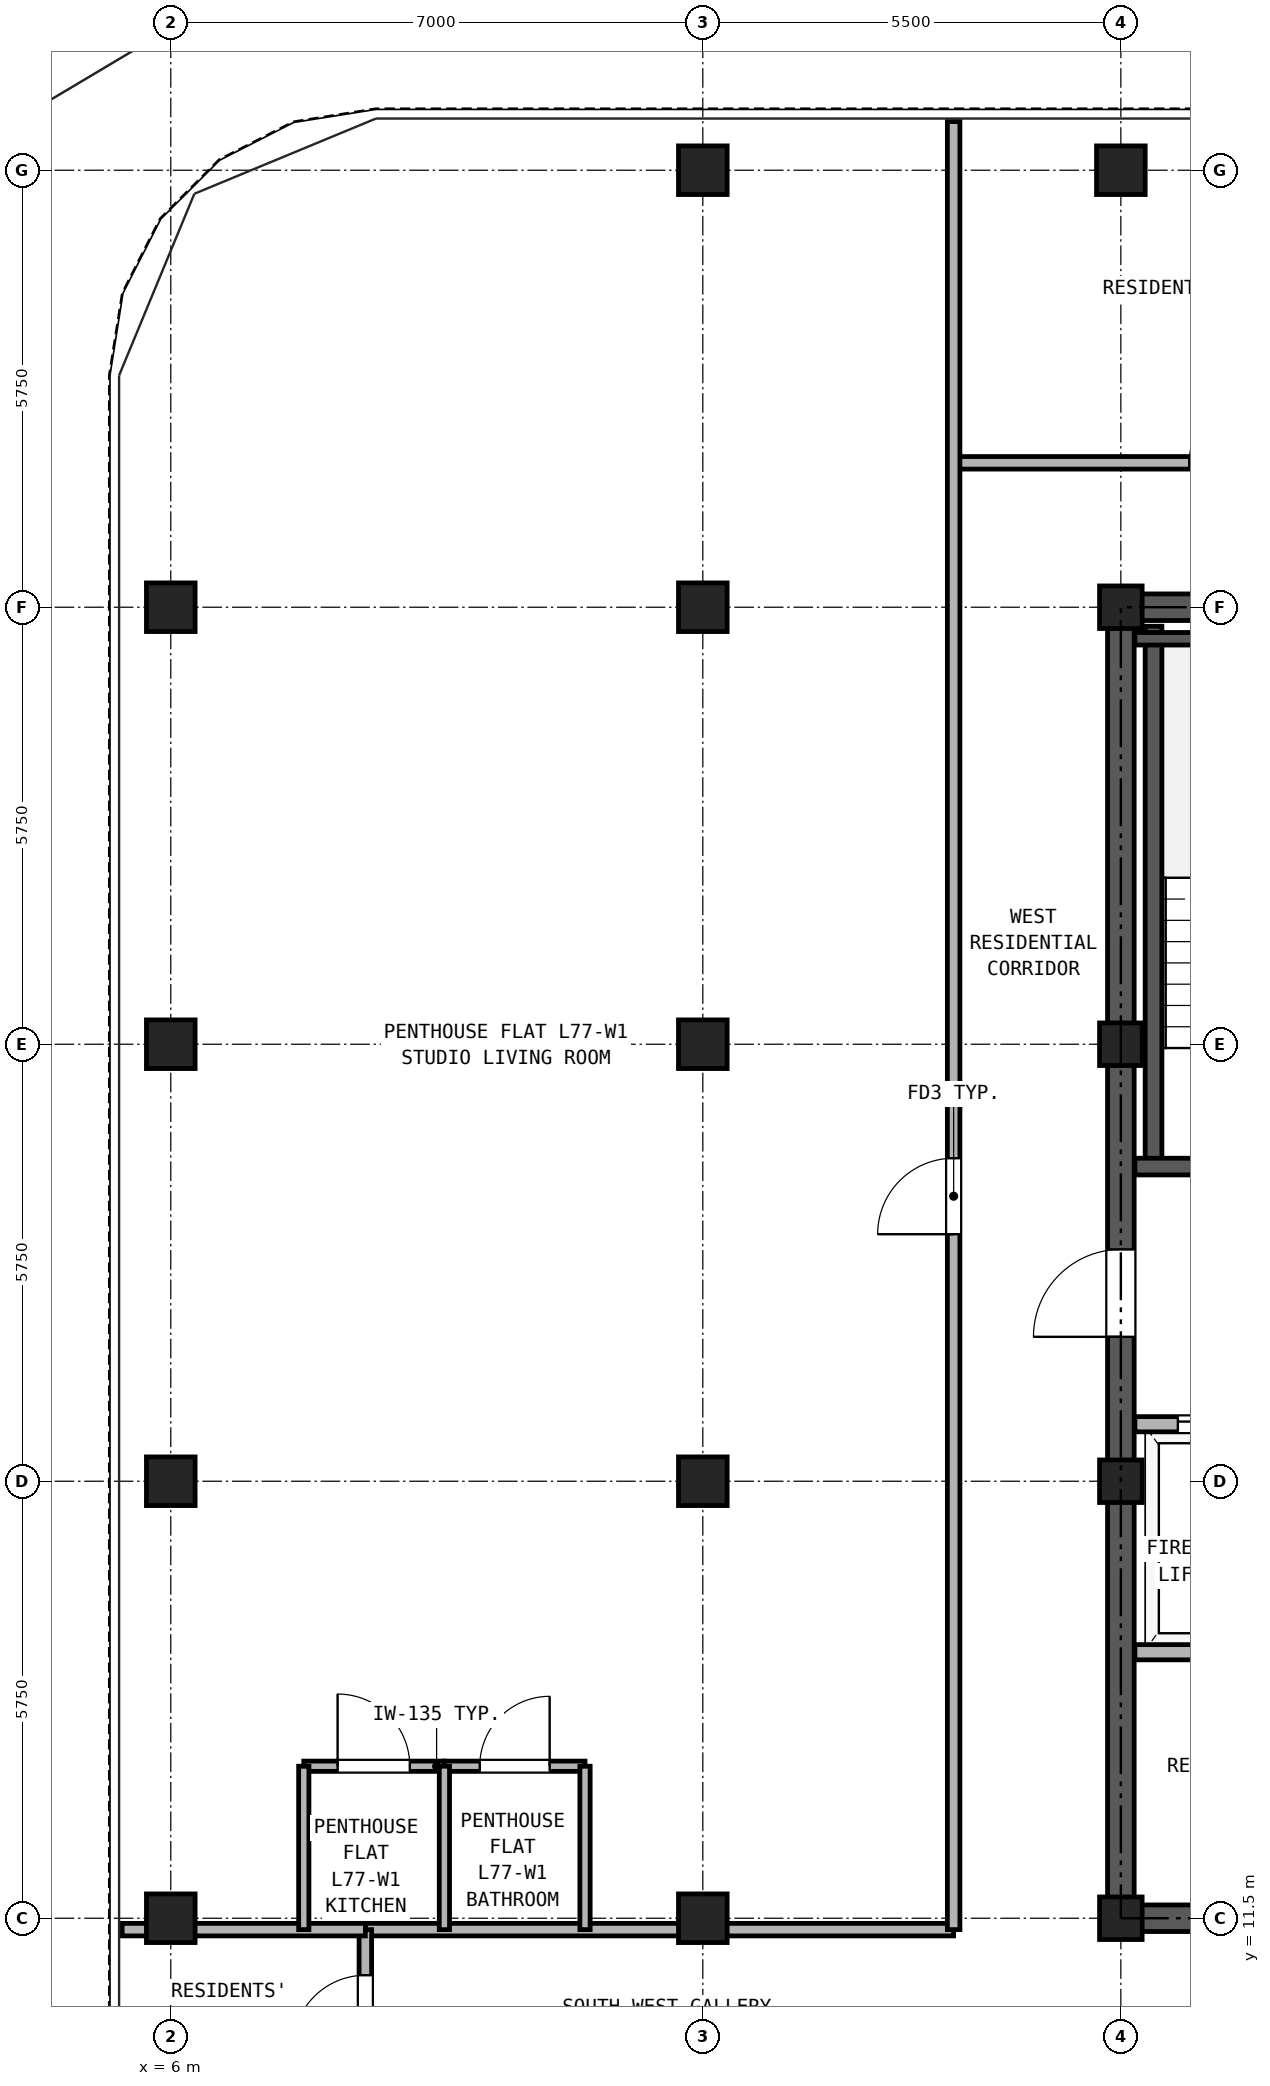
"""IFC4 building model, lengths in metres.
Left out: names, types, materials, properties, quantities, classifications, styles, units other than length and angle.
Written with IfcOpenShell. Run it as: python <this file> out.ifc"""

import sys

from ifc_helpers import new_model, si_unit, direction, frame, frame_2d, origin, origin_2d, place, context, subcontext, project, spatial, rectangle, hollow_rectangle, extrude, source, transform, mapped, element, fill, save


model = new_model("IFC4")
c1 = context("Model", 3, precision=1e-05, world=origin(), true_north=direction((0.0, 1.0)))
c2 = subcontext(c1, "Body", "Model", "MODEL_VIEW")
j1 = project(units=[si_unit("LENGTHUNIT", "METRE"), si_unit("PLANEANGLEUNIT", "RADIAN")], contexts=[c1])
p1 = place(None, origin())
s1 = spatial("IfcSite", under=j1, at=p1, CompositionType="ELEMENT")
p2 = place(p1, origin())
s2 = spatial("IfcBuilding", under=s1, at=p2, CompositionType="ELEMENT")
p3 = place(p2, frame((0.0, 0.0, 268.1)))
s3 = spatial("IfcBuildingStorey", under=s2, at=p3, CompositionType="ELEMENT", Elevation=268.1)
m1 = source(origin(), c2, "Body", "SweptSolid", [
    extrude(hollow_rectangle(XDim=0.64, YDim=0.64, WallThickness=0.035, at=origin_2d()), origin(), (0.0, 0.0, 1.0), 2.98),
])
for number, where, z_axis, x_axis in (
    (1, (13.0, 34.5, 0.0), (0.0, 0.0, 1.0), (1.0, 0.0, 0.0)),
    (2, (18.5, 34.5, 0.0), (0.0, 0.0, 1.0), (1.0, 0.0, 0.0)),
    (3, (6.0, 11.5, 0.0), (0.0, 0.0, 1.0), (1.0, 0.0, 0.0)),
    (4, (6.0, 17.25, 0.0), (0.0, 0.0, 1.0), (1.0, 0.0, 0.0)),
    (5, (6.0, 23.0, 0.0), (0.0, 0.0, 1.0), (1.0, 0.0, 0.0)),
    (6, (6.0, 28.75, 0.0), (0.0, 0.0, 1.0), (1.0, 0.0, 0.0)),
    (7, (13.0, 11.5, 0.0), (0.0, 0.0, 1.0), (1.0, 0.0, 0.0)),
    (8, (13.0, 17.25, 0.0), (0.0, 0.0, 1.0), (1.0, 0.0, 0.0)),
    (9, (13.0, 23.0, 0.0), (0.0, 0.0, 1.0), (1.0, 0.0, 0.0)),
    (10, (13.0, 28.75, 0.0), (0.0, 0.0, 1.0), (1.0, 0.0, 0.0)),
):
    element("IfcColumn", number, at=place(p3, frame(where, z_axis=z_axis, x_axis=x_axis)), inside=s3, PredefinedType="COLUMN", context=c2, shape_type="MappedRepresentation", body=[
        mapped(m1, transform((0.0, 0.0, 0.0), x_axis=(1.0, 0.0, 0.0), y_axis=(0.0, 1.0, 0.0), z_axis=(0.0, 0.0, 1.0), scale=1.0)),
    ])
m2 = source(origin(), c2, "Body", "SweptSolid", [
    extrude(hollow_rectangle(XDim=0.56, YDim=0.56, WallThickness=0.03, at=origin_2d()), origin(), (0.0, 0.0, 1.0), 2.98),
])
for number, where, z_axis, x_axis in (
    (11, (18.5, 11.5, 0.0), (0.0, 0.0, 1.0), (1.0, 0.0, 0.0)),
    (12, (18.5, 17.25, 0.0), (0.0, 0.0, 1.0), (1.0, 0.0, 0.0)),
    (13, (18.5, 23.0, 0.0), (0.0, 0.0, 1.0), (1.0, 0.0, 0.0)),
    (14, (18.5, 28.75, 0.0), (0.0, 0.0, 1.0), (1.0, 0.0, 0.0)),
):
    element("IfcColumn", number, at=place(p3, frame(where, z_axis=z_axis, x_axis=x_axis)), inside=s3, PredefinedType="COLUMN", context=c2, shape_type="MappedRepresentation", body=[
        mapped(m2, transform((0.0, 0.0, 0.0), x_axis=(1.0, 0.0, 0.0), y_axis=(0.0, 1.0, 0.0), z_axis=(0.0, 0.0, 1.0), scale=1.0)),
    ])
p4 = place(p3, frame((18.325, 11.5, 0.0), z_axis=(0.0, 0.0, 1.0), x_axis=(1.0, 0.0, 0.0)))
e15 = element("IfcWall", 15, at=p4, inside=s3, PredefinedType="SHEAR", context=c2, shape_type="SweptSolid", body=[
    extrude(rectangle(XDim=10.35, YDim=0.35, at=frame_2d((5.175, 0.0))), origin(), (0.0, 0.0, 1.0), 2.98),
])
p5 = place(p4, frame((1.775, 0.0, 0.0)))
e16 = element("IfcOpeningElement", 16, at=p5, cuts=e15, PredefinedType="OPENING", context=c2, shape_type="SweptSolid", body=[
    extrude(rectangle(XDim=0.95, YDim=2.15, at=frame_2d((0.475, 1.075))), frame((0.0, 0.185, 0.0), z_axis=(0.0, -1.0, 0.0), x_axis=(1.0, 0.0, 0.0)), (0.0, 0.0, 1.0), 0.37),
])
p6 = place(p4, frame((5.275, 0.0, 0.0)))
e17 = element("IfcOpeningElement", 17, at=p6, cuts=e15, PredefinedType="OPENING", context=c2, shape_type="SweptSolid", body=[
    extrude(rectangle(XDim=0.95, YDim=2.15, at=frame_2d((0.475, 1.075))), frame((0.0, 0.185, 0.0), z_axis=(0.0, -1.0, 0.0), x_axis=(1.0, 0.0, 0.0)), (0.0, 0.0, 1.0), 0.37),
])
p7 = place(p4, frame((8.175, 0.0, 0.0)))
e18 = element("IfcOpeningElement", 18, at=p7, cuts=e15, PredefinedType="OPENING", context=c2, shape_type="SweptSolid", body=[
    extrude(rectangle(XDim=1.1, YDim=2.25, at=frame_2d((0.55, 1.125))), frame((0.0, 0.185, 0.0), z_axis=(0.0, -1.0, 0.0), x_axis=(1.0, 0.0, 0.0)), (0.0, 0.0, 1.0), 0.37),
])
p8 = place(p3, frame((18.325, 28.75, 0.0), z_axis=(0.0, 0.0, 1.0), x_axis=(1.0, 0.0, 0.0)))
e19 = element("IfcWall", 19, at=p8, inside=s3, PredefinedType="SHEAR", context=c2, shape_type="SweptSolid", body=[
    extrude(rectangle(XDim=10.35, YDim=0.35, at=frame_2d((5.175, 0.0))), origin(), (0.0, 0.0, 1.0), 2.98),
])
p9 = place(p8, frame((4.055, 0.0, 0.0)))
e20 = element("IfcOpeningElement", 20, at=p9, cuts=e19, PredefinedType="OPENING", context=c2, shape_type="SweptSolid", body=[
    extrude(rectangle(XDim=0.9, YDim=2.05, at=frame_2d((0.45, 1.025))), frame((0.0, 0.185, 0.0), z_axis=(0.0, -1.0, 0.0), x_axis=(1.0, 0.0, 0.0)), (0.0, 0.0, 1.0), 0.37),
])
p10 = place(p8, frame((5.595, 0.0, 0.0)))
e21 = element("IfcOpeningElement", 21, at=p10, cuts=e19, PredefinedType="OPENING", context=c2, shape_type="SweptSolid", body=[
    extrude(rectangle(XDim=0.9, YDim=2.05, at=frame_2d((0.45, 1.025))), frame((0.0, 0.185, 0.0), z_axis=(0.0, -1.0, 0.0), x_axis=(1.0, 0.0, 0.0)), (0.0, 0.0, 1.0), 0.37),
])
p11 = place(p3, frame((18.5, 11.675, 0.0), z_axis=(0.0, 0.0, 1.0), x_axis=(0.0, 1.0, 0.0)))
e22 = element("IfcWall", 22, at=p11, inside=s3, PredefinedType="SHEAR", context=c2, shape_type="SweptSolid", body=[
    extrude(rectangle(XDim=16.9, YDim=0.35, at=frame_2d((8.45, 0.0))), origin(), (0.0, 0.0, 1.0), 2.98),
])
p12 = place(p11, frame((7.475, 0.0, 0.0)))
e23 = element("IfcOpeningElement", 23, at=p12, cuts=e22, PredefinedType="OPENING", context=c2, shape_type="SweptSolid", body=[
    extrude(rectangle(XDim=1.15, YDim=2.2, at=frame_2d((0.575, 1.1))), frame((0.0, 0.185, 0.0), z_axis=(0.0, -1.0, 0.0), x_axis=(1.0, 0.0, 0.0)), (0.0, 0.0, 1.0), 0.37),
])
p13 = place(p3, frame((18.93, 21.39, 0.0), z_axis=(0.0, 0.0, 1.0), x_axis=(0.0, 1.0, 0.0)))
e24 = element("IfcWall", 24, at=p13, inside=s3, PredefinedType="SOLIDWALL", context=c2, shape_type="SweptSolid", body=[
    extrude(rectangle(XDim=7.11, YDim=0.22, at=frame_2d((3.555, 0.0))), origin(), (0.0, 0.0, 1.0), 2.98),
])
p14 = place(p3, frame((18.685, 28.335, 0.0), z_axis=(0.0, 0.0, 1.0), x_axis=(1.0, 0.0, 0.0)))
e25 = element("IfcWall", 25, at=p14, inside=s3, PredefinedType="PARTITIONING", context=c2, shape_type="SweptSolid", body=[
    extrude(rectangle(XDim=3.425, YDim=0.165, at=frame_2d((1.712, 0.0))), origin(), (0.0, 0.0, 1.0), 2.98),
])
p15 = place(p3, frame((18.685, 21.39, 0.0), z_axis=(0.0, 0.0, 1.0), x_axis=(1.0, 0.0, 0.0)))
e26 = element("IfcWall", 26, at=p15, inside=s3, PredefinedType="SOLIDWALL", context=c2, shape_type="SweptSolid", body=[
    extrude(rectangle(XDim=6.445, YDim=0.22, at=frame_2d((3.222, 0.0))), origin(), (0.0, 0.0, 1.0), 2.98),
])
p16 = place(p15, frame((1.165, 0.0, 0.0)))
e27 = element("IfcOpeningElement", 27, at=p16, cuts=e26, PredefinedType="OPENING", context=c2, shape_type="SweptSolid", body=[
    extrude(rectangle(XDim=1.15, YDim=2.2, at=frame_2d((0.575, 1.1))), frame((0.0, 0.12, 0.0), z_axis=(0.0, -1.0, 0.0), x_axis=(1.0, 0.0, 0.0)), (0.0, 0.0, 1.0), 0.24),
])
p17 = place(p15, frame((4.895, 0.0, 0.0)))
e28 = element("IfcOpeningElement", 28, at=p17, cuts=e26, PredefinedType="OPENING", context=c2, shape_type="SweptSolid", body=[
    extrude(rectangle(XDim=1.1, YDim=2.25, at=frame_2d((0.55, 1.125))), frame((0.0, 0.12, 0.0), z_axis=(0.0, -1.0, 0.0), x_axis=(1.0, 0.0, 0.0)), (0.0, 0.0, 1.0), 0.24),
])
p18 = place(p3, frame((18.685, 18.0, 0.0), z_axis=(0.0, 0.0, 1.0), x_axis=(1.0, 0.0, 0.0)))
e29 = element("IfcWall", 29, at=p18, inside=s3, PredefinedType="PARTITIONING", context=c2, shape_type="SweptSolid", body=[
    extrude(rectangle(XDim=9.63, YDim=0.2, at=frame_2d((4.815, 0.0))), origin(), (0.0, 0.0, 1.0), 2.98),
])
p19 = place(p18, frame((0.565, 0.0, 0.0)))
e30 = element("IfcOpeningElement", 30, at=p19, cuts=e29, PredefinedType="OPENING", context=c2, shape_type="SweptSolid", body=[
    extrude(rectangle(XDim=1.3, YDim=2.3, at=frame_2d((0.65, 1.15))), frame((0.0, 0.11, 0.0), z_axis=(0.0, -1.0, 0.0), x_axis=(1.0, 0.0, 0.0)), (0.0, 0.0, 1.0), 0.22),
])
p20 = place(p18, frame((2.665, 0.0, 0.0)))
e31 = element("IfcOpeningElement", 31, at=p20, cuts=e29, PredefinedType="OPENING", context=c2, shape_type="SweptSolid", body=[
    extrude(rectangle(XDim=1.3, YDim=2.3, at=frame_2d((0.65, 1.15))), frame((0.0, 0.11, 0.0), z_axis=(0.0, -1.0, 0.0), x_axis=(1.0, 0.0, 0.0)), (0.0, 0.0, 1.0), 0.22),
])
p21 = place(p18, frame((7.165, 0.0, 0.0)))
e32 = element("IfcOpeningElement", 32, at=p21, cuts=e29, PredefinedType="OPENING", context=c2, shape_type="SweptSolid", body=[
    extrude(rectangle(XDim=1.0, YDim=2.15, at=frame_2d((0.5, 1.075))), frame((0.0, 0.11, 0.0), z_axis=(0.0, -1.0, 0.0), x_axis=(1.0, 0.0, 0.0)), (0.0, 0.0, 1.0), 0.22),
])
p22 = place(p3, frame((18.685, 15.0, 0.0), z_axis=(0.0, 0.0, 1.0), x_axis=(1.0, 0.0, 0.0)))
e33 = element("IfcWall", 33, at=p22, inside=s3, PredefinedType="PARTITIONING", context=c2, shape_type="SweptSolid", body=[
    extrude(rectangle(XDim=9.63, YDim=0.2, at=frame_2d((4.815, 0.0))), origin(), (0.0, 0.0, 1.0), 2.98),
])
p23 = place(p3, frame((8.56, 11.35, 0.0), z_axis=(0.0, 0.0, 1.0), x_axis=(1.0, 0.0, 0.0)))
e34 = element("IfcWall", 34, at=p23, inside=s3, PredefinedType="PARTITIONING", context=c2, shape_type="SweptSolid", body=[
    extrude(rectangle(XDim=7.74, YDim=0.165, at=frame_2d((3.87, 0.0))), origin(), (0.0, 0.0, 1.0), 2.428),
])
p24 = place(p3, frame((8.56, 9.35, 0.0), z_axis=(0.0, 0.0, 1.0), x_axis=(0.0, 1.0, 0.0)))
e35 = element("IfcWall", 35, at=p24, inside=s3, PredefinedType="PARTITIONING", context=c2, shape_type="SweptSolid", body=[
    extrude(rectangle(XDim=2.0, YDim=0.165, at=frame_2d((1.0, 0.0))), origin(), (0.0, 0.0, 1.0), 2.98),
])
p25 = place(p24, frame((0.45, 0.0, 0.0)))
e36 = element("IfcOpeningElement", 36, at=p25, cuts=e35, PredefinedType="OPENING", context=c2, shape_type="SweptSolid", body=[
    extrude(rectangle(XDim=0.95, YDim=2.15, at=frame_2d((0.475, 1.075))), frame((0.0, 0.093, 0.0), z_axis=(0.0, -1.0, 0.0), x_axis=(1.0, 0.0, 0.0)), (0.0, 0.0, 1.0), 0.185),
])
p26 = place(p3, frame((16.3, 30.65, 0.0), z_axis=(0.0, 0.0, 1.0), x_axis=(1.0, 0.0, 0.0)))
e37 = element("IfcWall", 37, at=p26, inside=s3, PredefinedType="PARTITIONING", context=c2, shape_type="SweptSolid", body=[
    extrude(rectangle(XDim=14.4, YDim=0.165, at=frame_2d((7.2, 0.0))), origin(), (0.0, 0.0, 1.0), 2.98),
])
p27 = place(p26, frame((3.1, 0.0, 0.0)))
e38 = element("IfcOpeningElement", 38, at=p27, cuts=e37, PredefinedType="OPENING", context=c2, shape_type="SweptSolid", body=[
    extrude(rectangle(XDim=0.95, YDim=2.15, at=frame_2d((0.475, 1.075))), frame((0.0, 0.093, 0.0), z_axis=(0.0, -1.0, 0.0), x_axis=(1.0, 0.0, 0.0)), (0.0, 0.0, 1.0), 0.185),
])
p28 = place(p26, frame((8.0, 0.0, 0.0)))
e39 = element("IfcOpeningElement", 39, at=p28, cuts=e37, PredefinedType="OPENING", context=c2, shape_type="SweptSolid", body=[
    extrude(rectangle(XDim=0.95, YDim=2.15, at=frame_2d((0.475, 1.075))), frame((0.0, 0.093, 0.0), z_axis=(0.0, -1.0, 0.0), x_axis=(1.0, 0.0, 0.0)), (0.0, 0.0, 1.0), 0.185),
])
p29 = place(p26, frame((11.6, 0.0, 0.0)))
e40 = element("IfcOpeningElement", 40, at=p29, cuts=e37, PredefinedType="OPENING", context=c2, shape_type="SweptSolid", body=[
    extrude(rectangle(XDim=0.92, YDim=2.1, at=frame_2d((0.46, 1.05))), frame((0.0, 0.093, 0.0), z_axis=(0.0, -1.0, 0.0), x_axis=(1.0, 0.0, 0.0)), (0.0, 0.0, 1.0), 0.185),
])
p30 = place(p3, frame((16.3, 11.35, 0.0), z_axis=(0.0, 0.0, 1.0), x_axis=(0.0, 1.0, 0.0)))
e41 = element("IfcWall", 41, at=p30, inside=s3, PredefinedType="PARTITIONING", context=c2, shape_type="SweptSolid", body=[
    extrude(rectangle(XDim=23.79, YDim=0.165, at=frame_2d((11.895, 0.0))), origin(), (0.0, 0.0, 1.0), 2.98),
])
p31 = place(p30, frame((9.15, 0.0, 0.0)))
e42 = element("IfcOpeningElement", 42, at=p31, cuts=e41, PredefinedType="OPENING", context=c2, shape_type="SweptSolid", body=[
    extrude(rectangle(XDim=1.0, YDim=2.15, at=frame_2d((0.5, 1.075))), frame((0.0, 0.093, 0.0), z_axis=(0.0, -1.0, 0.0), x_axis=(1.0, 0.0, 0.0)), (0.0, 0.0, 1.0), 0.185),
])
p32 = place(p3, frame((5.36, 11.35, 0.0), z_axis=(0.0, 0.0, 1.0), x_axis=(1.0, 0.0, 0.0)))
e43 = element("IfcWall", 43, at=p32, inside=s3, PredefinedType="PARTITIONING", context=c2, shape_type="SweptSolid", body=[
    extrude(rectangle(XDim=3.2, YDim=0.165, at=frame_2d((1.6, 0.0))), origin(), (0.0, 0.0, 1.0), 2.428),
])
p33 = place(p3, frame((7.75, 13.5, 0.0), z_axis=(0.0, 0.0, 1.0), x_axis=(1.0, 0.0, 0.0)))
e44 = element("IfcWall", 44, at=p33, inside=s3, PredefinedType="PARTITIONING", context=c2, shape_type="SweptSolid", body=[
    extrude(rectangle(XDim=1.85, YDim=0.135, at=frame_2d((0.925, 0.0))), origin(), (0.0, 0.0, 1.0), 2.98),
])
p34 = place(p33, frame((0.445, 0.0, 0.0)))
e45 = element("IfcOpeningElement", 45, at=p34, cuts=e44, PredefinedType="OPENING", context=c2, shape_type="SweptSolid", body=[
    extrude(rectangle(XDim=0.95, YDim=2.15, at=frame_2d((0.475, 1.075))), frame((0.0, 0.077, 0.0), z_axis=(0.0, -1.0, 0.0), x_axis=(1.0, 0.0, 0.0)), (0.0, 0.0, 1.0), 0.155),
])
p35 = place(p3, frame((9.6, 13.5, 0.0), z_axis=(0.0, 0.0, 1.0), x_axis=(1.0, 0.0, 0.0)))
e46 = element("IfcWall", 46, at=p35, inside=s3, PredefinedType="PARTITIONING", context=c2, shape_type="SweptSolid", body=[
    extrude(rectangle(XDim=1.85, YDim=0.135, at=frame_2d((0.925, 0.0))), origin(), (0.0, 0.0, 1.0), 2.98),
])
p36 = place(p35, frame((0.465, 0.0, 0.0)))
e47 = element("IfcOpeningElement", 47, at=p36, cuts=e46, PredefinedType="OPENING", context=c2, shape_type="SweptSolid", body=[
    extrude(rectangle(XDim=0.92, YDim=2.1, at=frame_2d((0.46, 1.05))), frame((0.0, 0.077, 0.0), z_axis=(0.0, -1.0, 0.0), x_axis=(1.0, 0.0, 0.0)), (0.0, 0.0, 1.0), 0.155),
])
for number, where, z_axis, x_axis in (
    (48, (7.75, 11.35, 0.0), (0.0, 0.0, 1.0), (0.0, 1.0, 0.0)),
    (49, (9.6, 11.35, 0.0), (0.0, 0.0, 1.0), (0.0, 1.0, 0.0)),
    (50, (11.45, 11.35, 0.0), (0.0, 0.0, 1.0), (0.0, 1.0, 0.0)),
):
    element("IfcWall", number, at=place(p3, frame(where, z_axis=z_axis, x_axis=x_axis)), inside=s3, PredefinedType="PARTITIONING", context=c2, shape_type="SweptSolid", body=[
        extrude(rectangle(XDim=2.15, YDim=0.135, at=frame_2d((1.075, 0.0))), origin(), (0.0, 0.0, 1.0), 2.98),
    ])
p37 = place(p19, origin())
e51 = element("IfcDoor", 51, at=p37, inside=s3, OperationType="DOUBLE_DOOR_SLIDING", PredefinedType="DOOR", context=c2, shape_type="SweptSolid", body=[
    extrude(rectangle(XDim=1.3, YDim=2.3, at=frame_2d((0.65, 1.15))), frame((0.0, 0.025, 0.0), z_axis=(0.0, -1.0, 0.0), x_axis=(1.0, 0.0, 0.0)), (0.0, 0.0, 1.0), 0.05),
])
fill(e30, e51)
p38 = place(p12, frame((1.15, 0.0, 0.0), z_axis=(0.0, 0.0, 1.0), x_axis=(-1.0, 0.0, 0.0)))
e52 = element("IfcDoor", 52, at=p38, inside=s3, OperationType="SINGLE_SWING_LEFT", PredefinedType="DOOR", context=c2, shape_type="SweptSolid", body=[
    extrude(rectangle(XDim=1.15, YDim=2.2, at=frame_2d((0.575, 1.1))), frame((0.0, 0.025, 0.0), z_axis=(0.0, -1.0, 0.0), x_axis=(1.0, 0.0, 0.0)), (0.0, 0.0, 1.0), 0.05),
])
fill(e23, e52)
p39 = place(p25, frame((0.95, 0.0, 0.0), z_axis=(0.0, 0.0, 1.0), x_axis=(-1.0, 0.0, 0.0)))
e53 = element("IfcDoor", 53, at=p39, inside=s3, OperationType="SINGLE_SWING_LEFT", PredefinedType="DOOR", context=c2, shape_type="SweptSolid", body=[
    extrude(rectangle(XDim=0.95, YDim=2.15, at=frame_2d((0.475, 1.075))), frame((0.0, 0.025, 0.0), z_axis=(0.0, -1.0, 0.0), x_axis=(1.0, 0.0, 0.0)), (0.0, 0.0, 1.0), 0.05),
])
fill(e36, e53)
p40 = place(p34, origin())
e54 = element("IfcDoor", 54, at=p40, inside=s3, OperationType="SINGLE_SWING_LEFT", PredefinedType="DOOR", context=c2, shape_type="SweptSolid", body=[
    extrude(rectangle(XDim=0.95, YDim=2.15, at=frame_2d((0.475, 1.075))), frame((0.0, 0.025, 0.0), z_axis=(0.0, -1.0, 0.0), x_axis=(1.0, 0.0, 0.0)), (0.0, 0.0, 1.0), 0.05),
])
fill(e45, e54)
p41 = place(p36, origin())
e55 = element("IfcDoor", 55, at=p41, inside=s3, OperationType="SINGLE_SWING_RIGHT", PredefinedType="DOOR", context=c2, shape_type="SweptSolid", body=[
    extrude(rectangle(XDim=0.92, YDim=2.1, at=frame_2d((0.46, 1.05))), frame((0.0, 0.025, 0.0), z_axis=(0.0, -1.0, 0.0), x_axis=(1.0, 0.0, 0.0)), (0.0, 0.0, 1.0), 0.05),
])
fill(e47, e55)
p42 = place(p31, origin())
e56 = element("IfcDoor", 56, at=p42, inside=s3, OperationType="SINGLE_SWING_LEFT", PredefinedType="DOOR", context=c2, shape_type="SweptSolid", body=[
    extrude(rectangle(XDim=1.0, YDim=2.15, at=frame_2d((0.5, 1.075))), frame((0.0, 0.025, 0.0), z_axis=(0.0, -1.0, 0.0), x_axis=(1.0, 0.0, 0.0)), (0.0, 0.0, 1.0), 0.05),
])
fill(e42, e56)
p43 = place(p27, origin())
e57 = element("IfcDoor", 57, at=p43, inside=s3, OperationType="SINGLE_SWING_RIGHT", PredefinedType="DOOR", context=c2, shape_type="SweptSolid", body=[
    extrude(rectangle(XDim=0.95, YDim=2.15, at=frame_2d((0.475, 1.075))), frame((0.0, 0.025, 0.0), z_axis=(0.0, -1.0, 0.0), x_axis=(1.0, 0.0, 0.0)), (0.0, 0.0, 1.0), 0.05),
])
fill(e38, e57)
save(model, sys.argv[1])
